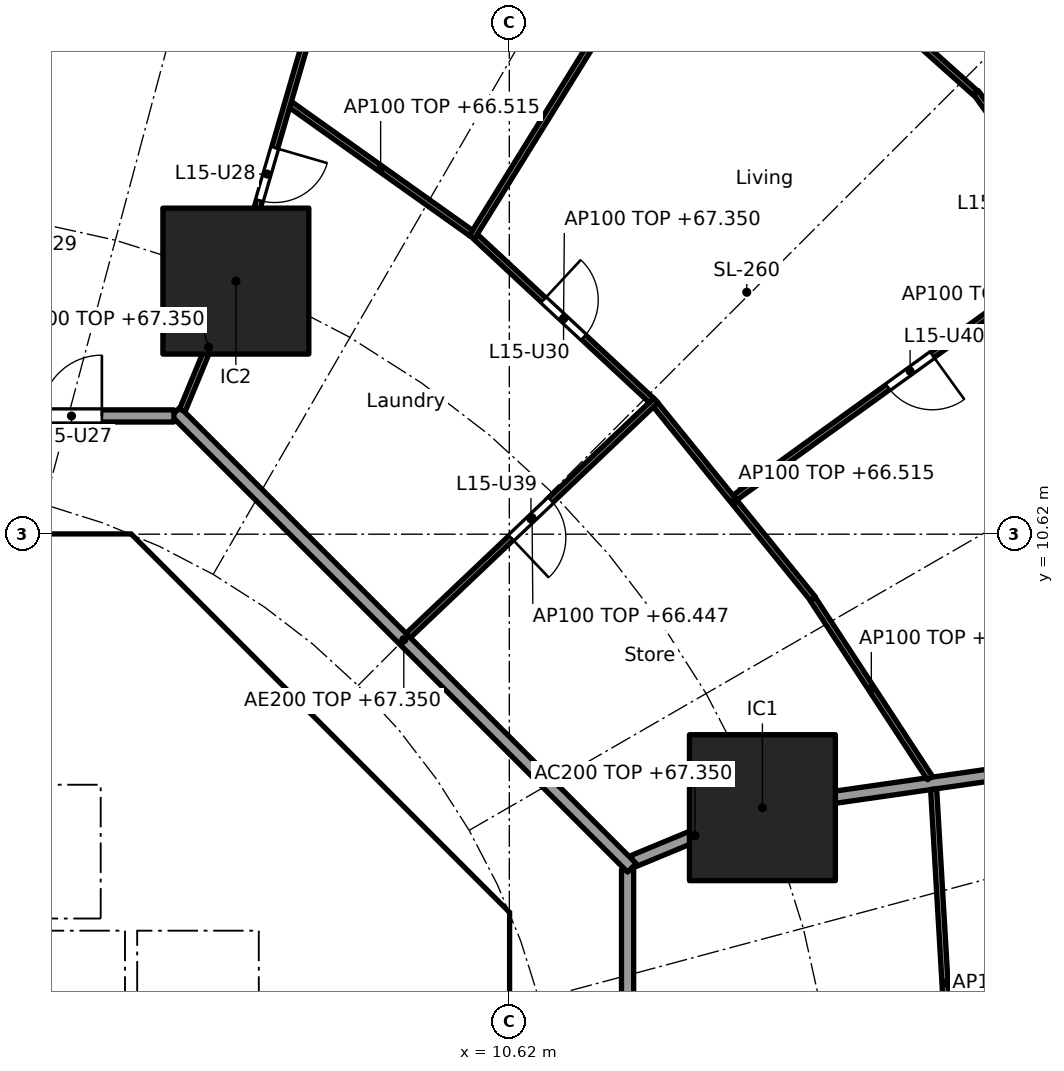
"""IFC4 building model, lengths in metres.
Left out: names, types, materials, properties, quantities, classifications, styles, units other than length and angle.
Written with IfcOpenShell. Run it as: python <this file> out.ifc"""

import sys

from ifc_helpers import new_model, si_unit, direction, frame, frame_2d, origin, origin_2d, place, context, subcontext, project, spatial, polyline, rectangle, outline, extrude, element, fill, save


model = new_model("IFC4")
c1 = context("Model", 3, precision=1e-05, world=origin(), true_north=direction((0.0, 1.0)))
c2 = subcontext(c1, "Body", "Model", "MODEL_VIEW")
j1 = project(units=[si_unit("LENGTHUNIT", "METRE"), si_unit("PLANEANGLEUNIT", "RADIAN")], contexts=[c1])
p1 = place(None, origin())
s1 = spatial("IfcSite", under=j1, at=p1, CompositionType="ELEMENT")
p2 = place(p1, origin())
s2 = spatial("IfcBuilding", under=s1, at=p2, CompositionType="ELEMENT")
p3 = place(p2, frame((0.0, 0.0, 64.0)))
s3 = spatial("IfcBuildingStorey", under=s2, at=p3, CompositionType="ELEMENT", Elevation=64.0)
for number, where, z_axis, x_axis in (
    (1, (14.782, 6.123, 0.0), (0.0, 0.0, 1.0), (1.0, 0.0, 0.0)),
    (2, (6.123, 14.782, 0.0), (0.0, 0.0, 1.0), (1.0, 0.0, 0.0)),
):
    element("IfcColumn", number, at=place(p3, frame(where, z_axis=z_axis, x_axis=x_axis)), inside=s3, PredefinedType="COLUMN", context=c2, shape_type="SweptSolid", body=[
        extrude(rectangle(XDim=2.4, YDim=2.4, at=origin_2d()), origin(), (0.0, 0.0, 1.0), 3.7),
    ])
p4 = place(p3, frame((9.988, 4.613, 0.0), z_axis=(0.0, 0.0, 1.0), x_axis=(-0.707106781187, 0.707106781187, 0.0)))
e3 = element("IfcWall", 3, at=p4, inside=s3, PredefinedType="SHEAR", context=c2, shape_type="SweptSolid", body=[
    extrude(rectangle(XDim=7.602, YDim=0.6, at=frame_2d((3.801, 0.0))), origin(), (0.0, 0.0, 1.0), 3.35),
])
p5 = place(p4, frame((3.201, 0.0, 0.0)))
e4 = element("IfcOpeningElement", 4, at=p5, cuts=e3, PredefinedType="OPENING", context=c2, shape_type="SweptSolid", body=[
    extrude(rectangle(XDim=1.2, YDim=2.1, at=frame_2d((0.6, 1.05))), frame((0.0, 0.31, 0.0), z_axis=(0.0, -1.0, 0.0), x_axis=(1.0, 0.0, 0.0)), (0.0, 0.0, 1.0), 0.62),
])
p6 = place(p3, frame((4.0, 4.3, 0.0), z_axis=(0.0, 0.0, 1.0), x_axis=(0.0, 1.0, 0.0)))
e5 = element("IfcWall", 5, at=p6, inside=s3, PredefinedType="SOLIDWALL", context=c2, shape_type="SweptSolid", body=[
    extrude(rectangle(XDim=2.2, YDim=0.2, at=frame_2d((1.1, 0.0))), origin(), (0.0, 0.0, 1.0), 3.35),
])
p7 = place(p6, frame((0.55, 0.0, 0.0)))
e6 = element("IfcOpeningElement", 6, at=p7, cuts=e5, PredefinedType="OPENING", context=c2, shape_type="SweptSolid", body=[
    extrude(rectangle(XDim=1.1, YDim=2.1, at=frame_2d((0.55, 1.05))), frame((0.0, 0.11, 0.0), z_axis=(0.0, -1.0, 0.0), x_axis=(1.0, 0.0, 0.0)), (0.0, 0.0, 1.0), 0.22),
])
p8 = place(p3, frame((6.7, 4.0, 0.0), z_axis=(0.0, 0.0, 1.0), x_axis=(1.0, 0.0, 0.0)))
e7 = element("IfcWall", 7, at=p8, inside=s3, PredefinedType="SOLIDWALL", context=c2, shape_type="SweptSolid", body=[
    extrude(rectangle(XDim=3.325, YDim=0.2, at=frame_2d((1.662, 0.0))), origin(), (0.0, 0.0, 1.0), 3.35),
])
p9 = place(p8, frame((1.25, 0.0, 0.0)))
e8 = element("IfcOpeningElement", 8, at=p9, cuts=e7, PredefinedType="OPENING", context=c2, shape_type="SweptSolid", body=[
    extrude(rectangle(XDim=1.1, YDim=2.1, at=frame_2d((0.55, 1.05))), frame((0.0, 0.11, 0.0), z_axis=(0.0, -1.0, 0.0), x_axis=(1.0, 0.0, 0.0)), (0.0, 0.0, 1.0), 0.22),
])
p10 = place(p3, frame((4.0, 7.025, 0.0), z_axis=(0.0, 0.0, 1.0), x_axis=(0.0, 1.0, 0.0)))
e9 = element("IfcWall", 9, at=p10, inside=s3, PredefinedType="SOLIDWALL", context=c2, shape_type="SweptSolid", body=[
    extrude(rectangle(XDim=3.0, YDim=0.2, at=frame_2d((1.5, 0.0))), origin(), (0.0, 0.0, 1.0), 3.35),
])
p11 = place(p10, frame((0.925, 0.0, 0.0)))
e10 = element("IfcOpeningElement", 10, at=p11, cuts=e9, PredefinedType="OPENING", context=c2, shape_type="SweptSolid", body=[
    extrude(rectangle(XDim=1.1, YDim=2.1, at=frame_2d((0.55, 1.05))), frame((0.0, 0.11, 0.0), z_axis=(0.0, -1.0, 0.0), x_axis=(1.0, 0.0, 0.0)), (0.0, 0.0, 1.0), 0.22),
])
p12 = place(p3, origin())
e11 = element("IfcWall", 11, at=p12, inside=s3, PredefinedType="SHEAR", context=c2, shape_type="SweptSolid", body=[
    extrude(outline(polyline([(-4.152, 10.025), (-4.401, 9.776), (-4.825, 10.2), (-4.401, 10.625), (4.401, 10.625), (4.825, 10.2), (4.401, 9.776), (4.152, 10.025), (-4.152, 10.025)])), origin(), (0.0, 0.0, 1.0), 3.35),
])
p13 = place(p3, origin())
e12 = element("IfcWall", 12, at=p13, inside=s3, PredefinedType="SHEAR", context=c2, shape_type="SweptSolid", body=[
    extrude(outline(polyline([(9.776, -4.401), (10.025, -4.152), (10.025, -3.801), (10.025, 4.152), (9.776, 4.401), (10.2, 4.825), (10.625, 4.401), (10.625, -4.401), (10.2, -4.825), (9.776, -4.401)])), origin(), (0.0, 0.0, 1.0), 3.35),
])
p14 = place(p3, origin())
e13 = element("IfcWall", 13, at=p14, inside=s3, PredefinedType="SOLIDWALL", context=c2, shape_type="SweptSolid", body=[
    extrude(outline(polyline([(-6.5, 2.1), (-6.7, 2.1), (-6.7, 4.3), (6.7, 4.3), (6.7, 2.1), (6.5, 2.1), (6.5, 4.1), (4.5, 4.1), (4.5, 2.1), (4.3, 2.1), (4.3, 4.1), (2.3, 4.1), (2.3, 2.1), (2.1, 2.1), (2.1, 4.1), (0.1, 4.1), (0.1, 2.1), (-0.1, 2.1), (-0.1, 4.1), (-2.1, 4.1), (-2.1, 2.1), (-2.3, 2.1), (-2.3, 4.1), (-4.3, 4.1), (-4.3, 2.1), (-4.5, 2.1), (-4.5, 4.1), (-6.5, 4.1), (-6.5, 2.1)])), origin(), (0.0, 0.0, 1.0), 3.35),
])
p15 = place(p3, origin())
e14 = element("IfcWall", 14, at=p15, inside=s3, PredefinedType="SOLIDWALL", context=c2, shape_type="SweptSolid", body=[
    extrude(outline(polyline([(4.1, 6.5), (-4.1, 6.5), (-4.1, 7.025), (4.1, 7.025), (4.1, 6.5)])), origin(), (0.0, 0.0, 1.0), 3.35),
])
p16 = place(p3, origin())
e15 = element("IfcWall", 15, at=p16, inside=s3, PredefinedType="SOLIDWALL", context=c2, shape_type="SweptSolid", body=[
    extrude(outline(polyline([(7.025, -3.9), (6.7, -3.9), (6.7, 3.9), (7.025, 3.9), (7.025, -3.9)])), origin(), (0.0, 0.0, 1.0), 3.35),
])
p17 = place(p3, frame((12.657, 5.243, 0.0), z_axis=(0.0, 0.0, 1.0), x_axis=(0.923853160736, 0.382747093259, 0.0)))
e16 = element("IfcWall", 16, at=p17, inside=s3, PredefinedType="PARTITIONING", context=c2, shape_type="SweptSolid", body=[
    extrude(rectangle(XDim=2.2, YDim=0.2, at=frame_2d((1.1, 0.0))), origin(), (0.0, 0.0, 1.0), 3.35),
])
p18 = place(p3, frame((14.832, 6.13, 0.0), z_axis=(0.0, 0.0, 1.0), x_axis=(0.989836541293, 0.142209779978, 0.0)))
e17 = element("IfcWall", 17, at=p18, inside=s3, PredefinedType="PARTITIONING", context=c2, shape_type="SweptSolid", body=[
    extrude(rectangle(XDim=15.909, YDim=0.2, at=frame_2d((7.955, 0.0))), origin(), (0.0, 0.0, 1.0), 2.515),
])
p19 = place(p3, frame((12.565, -5.104, 0.0), z_axis=(0.0, 0.0, 1.0), x_axis=(0.0, 1.0, 0.0)))
e18 = element("IfcWall", 18, at=p19, inside=s3, PredefinedType="PARTITIONING", context=c2, shape_type="SweptSolid", body=[
    extrude(rectangle(XDim=10.209, YDim=0.2, at=frame_2d((5.104, 0.0))), origin(), (0.0, 0.0, 1.0), 3.35),
])
p20 = place(p3, frame((12.635, 5.134, 0.0), z_axis=(0.0, 0.0, 1.0), x_axis=(-0.707106781187, 0.707106781187, 0.0)))
e19 = element("IfcWall", 19, at=p20, inside=s3, PredefinedType="PARTITIONING", context=c2, shape_type="SweptSolid", body=[
    extrude(rectangle(XDim=10.609, YDim=0.2, at=frame_2d((5.305, 0.0))), origin(), (0.0, 0.0, 1.0), 3.35),
])
p21 = place(p3, frame((5.104, 12.565, 0.0), z_axis=(0.0, 0.0, 1.0), x_axis=(-1.0, 0.0, 0.0)))
e20 = element("IfcWall", 20, at=p21, inside=s3, PredefinedType="PARTITIONING", context=c2, shape_type="SweptSolid", body=[
    extrude(rectangle(XDim=10.409, YDim=0.2, at=frame_2d((5.205, 0.0))), origin(), (0.0, 0.0, 1.0), 3.35),
])
p22 = place(p21, frame((1.185, 0.0, 0.0)))
e21 = element("IfcOpeningElement", 21, at=p22, cuts=e20, PredefinedType="OPENING", context=c2, shape_type="SweptSolid", body=[
    extrude(rectangle(XDim=1.0, YDim=2.1, at=frame_2d((0.5, 1.05))), frame((0.0, 0.11, 0.0), z_axis=(0.0, -1.0, 0.0), x_axis=(1.0, 0.0, 0.0)), (0.0, 0.0, 1.0), 0.22),
])
p23 = place(p3, frame((17.971, 0.05, 0.0), z_axis=(0.0, 0.0, 1.0), x_axis=(-0.058513659907, 0.998286607946, 0.0)))
e22 = element("IfcWall", 22, at=p23, inside=s3, PredefinedType="PARTITIONING", context=c2, shape_type="SweptSolid", body=[
    extrude(rectangle(XDim=6.388, YDim=0.1, at=frame_2d((3.194, 0.0))), origin(), (0.0, 0.0, 1.0), 2.515),
])
p24 = place(p3, frame((17.537, 6.61, 0.0), z_axis=(0.0, 0.0, 1.0), x_axis=(-0.547637987196, 0.836715384692, 0.0)))
e23 = element("IfcWall", 23, at=p24, inside=s3, PredefinedType="PARTITIONING", context=c2, shape_type="SweptSolid", body=[
    extrude(rectangle(XDim=3.52, YDim=0.1, at=frame_2d((1.76, 0.0))), origin(), (0.0, 0.0, 1.0), 2.515),
])
p25 = place(p3, frame((15.614, 9.559, 0.0), z_axis=(0.0, 0.0, 1.0), x_axis=(-0.63012473344, 0.776493928056, 0.0)))
e24 = element("IfcWall", 24, at=p25, inside=s3, PredefinedType="PARTITIONING", context=c2, shape_type="SweptSolid", body=[
    extrude(rectangle(XDim=4.106, YDim=0.1, at=frame_2d((2.053, 0.0))), origin(), (0.0, 0.0, 1.0), 2.515),
])
p26 = place(p3, frame((21.908, 12.866, 0.0), z_axis=(0.0, 0.0, 1.0), x_axis=(-0.584553256988, 0.811355341231, 0.0)))
e25 = element("IfcWall", 25, at=p26, inside=s3, PredefinedType="PARTITIONING", context=c2, shape_type="SweptSolid", body=[
    extrude(rectangle(XDim=6.184, YDim=0.1, at=frame_2d((3.092, 0.0))), origin(), (0.0, 0.0, 1.0), 2.515),
])
p27 = place(p26, frame((4.163, 0.0, 0.0)))
e26 = element("IfcOpeningElement", 26, at=p27, cuts=e25, PredefinedType="OPENING", context=c2, shape_type="SweptSolid", body=[
    extrude(rectangle(XDim=0.9, YDim=2.1, at=frame_2d((0.45, 1.05))), frame((0.0, 0.06, 0.0), z_axis=(0.0, -1.0, 0.0), x_axis=(1.0, 0.0, 0.0)), (0.0, 0.0, 1.0), 0.12),
])
p28 = place(p3, frame((14.329, 11.221, 0.0), z_axis=(0.0, 0.0, 1.0), x_axis=(0.810671130917, 0.58550176558, 0.0)))
e27 = element("IfcWall", 27, at=p28, inside=s3, PredefinedType="PARTITIONING", context=c2, shape_type="SweptSolid", body=[
    extrude(rectangle(XDim=15.106, YDim=0.1, at=frame_2d((7.553, 0.0))), origin(), (0.0, 0.0, 1.0), 2.738),
])
p29 = place(p28, frame((3.105, 0.0, 0.0)))
e28 = element("IfcOpeningElement", 28, at=p29, cuts=e27, PredefinedType="OPENING", context=c2, shape_type="SweptSolid", body=[
    extrude(rectangle(XDim=0.9, YDim=2.1, at=frame_2d((0.45, 1.05))), frame((0.0, 0.06, 0.0), z_axis=(0.0, -1.0, 0.0), x_axis=(1.0, 0.0, 0.0)), (0.0, 0.0, 1.0), 0.12),
])
p30 = place(p3, frame((8.957, 8.953, 0.0), z_axis=(0.0, 0.0, 1.0), x_axis=(0.725253319157, 0.688482115273, 0.0)))
e29 = element("IfcWall", 29, at=p30, inside=s3, PredefinedType="PARTITIONING", context=c2, shape_type="SweptSolid", body=[
    extrude(rectangle(XDim=5.617, YDim=0.1, at=frame_2d((2.809, 0.0))), origin(), (0.0, 0.0, 1.0), 2.447),
])
p31 = place(p30, frame((2.333, 0.0, 0.0)))
e30 = element("IfcOpeningElement", 30, at=p31, cuts=e29, PredefinedType="OPENING", context=c2, shape_type="SweptSolid", body=[
    extrude(rectangle(XDim=0.9, YDim=2.1, at=frame_2d((0.45, 1.05))), frame((0.0, 0.06, 0.0), z_axis=(0.0, -1.0, 0.0), x_axis=(1.0, 0.0, 0.0)), (0.0, 0.0, 1.0), 0.12),
])
p32 = place(p3, frame((12.958, 12.82, 0.0), z_axis=(0.0, 0.0, 1.0), x_axis=(-0.732022571638, 0.681280378855, 0.0)))
e31 = element("IfcWall", 31, at=p32, inside=s3, PredefinedType="PARTITIONING", context=c2, shape_type="SweptSolid", body=[
    extrude(rectangle(XDim=3.95, YDim=0.1, at=frame_2d((1.975, 0.0))), origin(), (0.0, 0.0, 1.0), 3.35),
])
p33 = place(p32, frame((1.525, 0.0, 0.0)))
e32 = element("IfcOpeningElement", 32, at=p33, cuts=e31, PredefinedType="OPENING", context=c2, shape_type="SweptSolid", body=[
    extrude(rectangle(XDim=0.9, YDim=2.1, at=frame_2d((0.45, 1.05))), frame((0.0, 0.06, 0.0), z_axis=(0.0, -1.0, 0.0), x_axis=(1.0, 0.0, 0.0)), (0.0, 0.0, 1.0), 0.12),
])
p34 = place(p3, frame((18.285, 17.877, 0.0), z_axis=(0.0, 0.0, 1.0), x_axis=(-0.745806142791, 0.666163041136, 0.0)))
e33 = element("IfcWall", 33, at=p34, inside=s3, PredefinedType="PARTITIONING", context=c2, shape_type="SweptSolid", body=[
    extrude(rectangle(XDim=5.831, YDim=0.1, at=frame_2d((2.915, 0.0))), origin(), (0.0, 0.0, 1.0), 2.515),
])
p35 = place(p34, frame((3.923, 0.0, 0.0)))
e34 = element("IfcOpeningElement", 34, at=p35, cuts=e33, PredefinedType="OPENING", context=c2, shape_type="SweptSolid", body=[
    extrude(rectangle(XDim=0.9, YDim=2.1, at=frame_2d((0.45, 1.05))), frame((0.0, 0.06, 0.0), z_axis=(0.0, -1.0, 0.0), x_axis=(1.0, 0.0, 0.0)), (0.0, 0.0, 1.0), 0.12),
])
p36 = place(p3, frame((10.003, 15.503, 0.0), z_axis=(0.0, 0.0, 1.0), x_axis=(0.52645953022, 0.850200189979, 0.0)))
e35 = element("IfcWall", 35, at=p36, inside=s3, PredefinedType="PARTITIONING", context=c2, shape_type="SweptSolid", body=[
    extrude(rectangle(XDim=7.45, YDim=0.1, at=frame_2d((3.725, 0.0))), origin(), (0.0, 0.0, 1.0), 2.515),
])
p37 = place(p3, frame((9.989, 15.574, 0.0), z_axis=(0.0, 0.0, 1.0), x_axis=(-0.81494477814, 0.57953861699, 0.0)))
e36 = element("IfcWall", 36, at=p37, inside=s3, PredefinedType="PARTITIONING", context=c2, shape_type="SweptSolid", body=[
    extrude(rectangle(XDim=3.644, YDim=0.1, at=frame_2d((1.822, 0.0))), origin(), (0.0, 0.0, 1.0), 2.515),
])
p38 = place(p3, frame((5.243, 12.657, 0.0), z_axis=(0.0, 0.0, 1.0), x_axis=(0.382719158442, 0.923864733477, 0.0)))
e37 = element("IfcWall", 37, at=p38, inside=s3, PredefinedType="PARTITIONING", context=c2, shape_type="SweptSolid", body=[
    extrude(rectangle(XDim=2.25, YDim=0.1, at=frame_2d((1.125, 0.0))), origin(), (0.0, 0.0, 1.0), 3.35),
])
p39 = place(p3, frame((6.137, 14.83, 0.0), z_axis=(0.0, 0.0, 1.0), x_axis=(0.27985745069, 0.960041565399, 0.0)))
e38 = element("IfcWall", 38, at=p39, inside=s3, PredefinedType="PARTITIONING", context=c2, shape_type="SweptSolid", body=[
    extrude(rectangle(XDim=16.705, YDim=0.1, at=frame_2d((8.353, 0.0))), origin(), (0.0, 0.0, 1.0), 2.515),
])
p40 = place(p39, frame((1.334, 0.0, 0.0)))
e39 = element("IfcOpeningElement", 39, at=p40, cuts=e38, PredefinedType="OPENING", context=c2, shape_type="SweptSolid", body=[
    extrude(rectangle(XDim=0.9, YDim=2.1, at=frame_2d((0.45, 1.05))), frame((0.0, 0.06, 0.0), z_axis=(0.0, -1.0, 0.0), x_axis=(1.0, 0.0, 0.0)), (0.0, 0.0, 1.0), 0.12),
])
p41 = place(p39, frame((6.091, 0.0, 0.0)))
e40 = element("IfcOpeningElement", 40, at=p41, cuts=e38, PredefinedType="OPENING", context=c2, shape_type="SweptSolid", body=[
    extrude(rectangle(XDim=0.9, YDim=2.1, at=frame_2d((0.45, 1.05))), frame((0.0, 0.06, 0.0), z_axis=(0.0, -1.0, 0.0), x_axis=(1.0, 0.0, 0.0)), (0.0, 0.0, 1.0), 0.12),
])
p42 = place(p3, frame((1.744, 12.664, 0.0), z_axis=(0.0, 0.0, 1.0), x_axis=(0.090893639596, 0.995860605849, 0.0)))
e41 = element("IfcWall", 41, at=p42, inside=s3, PredefinedType="PARTITIONING", context=c2, shape_type="SweptSolid", body=[
    extrude(rectangle(XDim=19.374, YDim=0.1, at=frame_2d((9.687, 0.0))), origin(), (0.0, 0.0, 1.0), 2.447),
])
p43 = place(p42, frame((2.27, 0.0, 0.0)))
e42 = element("IfcOpeningElement", 42, at=p43, cuts=e41, PredefinedType="OPENING", context=c2, shape_type="SweptSolid", body=[
    extrude(rectangle(XDim=0.9, YDim=2.1, at=frame_2d((0.45, 1.05))), frame((0.0, 0.06, 0.0), z_axis=(0.0, -1.0, 0.0), x_axis=(1.0, 0.0, 0.0)), (0.0, 0.0, 1.0), 0.12),
])
p44 = place(p42, frame((8.582, 0.0, 0.0)))
e43 = element("IfcOpeningElement", 43, at=p44, cuts=e41, PredefinedType="OPENING", context=c2, shape_type="SweptSolid", body=[
    extrude(rectangle(XDim=0.9, YDim=2.1, at=frame_2d((0.45, 1.05))), frame((0.0, 0.06, 0.0), z_axis=(0.0, -1.0, 0.0), x_axis=(1.0, 0.0, 0.0)), (0.0, 0.0, 1.0), 0.12),
])
p45 = place(p42, frame((15.548, 0.0, 0.0)))
e44 = element("IfcOpeningElement", 44, at=p45, cuts=e41, PredefinedType="OPENING", context=c2, shape_type="SweptSolid", body=[
    extrude(rectangle(XDim=0.9, YDim=2.1, at=frame_2d((0.45, 1.05))), frame((0.0, 0.06, 0.0), z_axis=(0.0, -1.0, 0.0), x_axis=(1.0, 0.0, 0.0)), (0.0, 0.0, 1.0), 0.12),
])
p46 = place(p7, origin())
e45 = element("IfcDoor", 45, at=p46, inside=s3, OperationType="DOUBLE_DOOR_SLIDING", PredefinedType="DOOR", context=c2, shape_type="SweptSolid", body=[
    extrude(rectangle(XDim=1.1, YDim=2.1, at=frame_2d((0.55, 1.05))), frame((0.0, 0.025, 0.0), z_axis=(0.0, -1.0, 0.0), x_axis=(1.0, 0.0, 0.0)), (0.0, 0.0, 1.0), 0.05),
])
fill(e6, e45)
p47 = place(p9, frame((1.1, 0.0, 0.0), x_axis=(-1.0, 0.0, 0.0)))
e46 = element("IfcDoor", 46, at=p47, inside=s3, OperationType="SINGLE_SWING_LEFT", PredefinedType="DOOR", context=c2, shape_type="SweptSolid", body=[
    extrude(rectangle(XDim=1.1, YDim=2.1, at=frame_2d((0.55, 1.05))), frame((0.0, 0.025, 0.0), z_axis=(0.0, -1.0, 0.0), x_axis=(1.0, 0.0, 0.0)), (0.0, 0.0, 1.0), 0.05),
])
fill(e8, e46)
p48 = place(p11, origin())
e47 = element("IfcDoor", 47, at=p48, inside=s3, OperationType="SINGLE_SWING_RIGHT", PredefinedType="DOOR", context=c2, shape_type="SweptSolid", body=[
    extrude(rectangle(XDim=1.1, YDim=2.1, at=frame_2d((0.55, 1.05))), frame((0.0, 0.025, 0.0), z_axis=(0.0, -1.0, 0.0), x_axis=(1.0, 0.0, 0.0)), (0.0, 0.0, 1.0), 0.05),
])
fill(e10, e47)
p49 = place(p5, origin())
e48 = element("IfcDoor", 48, at=p49, inside=s3, OperationType="SINGLE_SWING_RIGHT", PredefinedType="DOOR", context=c2, shape_type="SweptSolid", body=[
    extrude(rectangle(XDim=1.2, YDim=2.1, at=frame_2d((0.6, 1.05))), frame((0.0, 0.025, 0.0), z_axis=(0.0, -1.0, 0.0), x_axis=(1.0, 0.0, 0.0)), (0.0, 0.0, 1.0), 0.05),
])
fill(e4, e48)
p50 = place(p22, frame((1.0, 0.0, 0.0), x_axis=(-1.0, 0.0, 0.0)))
e49 = element("IfcDoor", 49, at=p50, inside=s3, OperationType="SINGLE_SWING_RIGHT", PredefinedType="DOOR", context=c2, shape_type="SweptSolid", body=[
    extrude(rectangle(XDim=1.0, YDim=2.1, at=frame_2d((0.5, 1.05))), frame((0.0, 0.025, 0.0), z_axis=(0.0, -1.0, 0.0), x_axis=(1.0, 0.0, 0.0)), (0.0, 0.0, 1.0), 0.05),
])
fill(e21, e49)
p51 = place(p40, frame((0.9, 0.0, 0.0), x_axis=(-1.0, 0.0, 0.0)))
e50 = element("IfcDoor", 50, at=p51, inside=s3, OperationType="SINGLE_SWING_LEFT", PredefinedType="DOOR", context=c2, shape_type="SweptSolid", body=[
    extrude(rectangle(XDim=0.9, YDim=2.1, at=frame_2d((0.45, 1.05))), frame((0.0, 0.025, 0.0), z_axis=(0.0, -1.0, 0.0), x_axis=(1.0, 0.0, 0.0)), (0.0, 0.0, 1.0), 0.05),
])
fill(e39, e50)
p52 = place(p33, frame((0.9, 0.0, 0.0), x_axis=(-1.0, 0.0, 0.0)))
e51 = element("IfcDoor", 51, at=p52, inside=s3, OperationType="SINGLE_SWING_LEFT", PredefinedType="DOOR", context=c2, shape_type="SweptSolid", body=[
    extrude(rectangle(XDim=0.9, YDim=2.1, at=frame_2d((0.45, 1.05))), frame((0.0, 0.025, 0.0), z_axis=(0.0, -1.0, 0.0), x_axis=(1.0, 0.0, 0.0)), (0.0, 0.0, 1.0), 0.05),
])
fill(e32, e51)
p53 = place(p31, frame((0.9, 0.0, 0.0), x_axis=(-1.0, 0.0, 0.0)))
e52 = element("IfcDoor", 52, at=p53, inside=s3, OperationType="SINGLE_SWING_RIGHT", PredefinedType="DOOR", context=c2, shape_type="SweptSolid", body=[
    extrude(rectangle(XDim=0.9, YDim=2.1, at=frame_2d((0.45, 1.05))), frame((0.0, 0.025, 0.0), z_axis=(0.0, -1.0, 0.0), x_axis=(1.0, 0.0, 0.0)), (0.0, 0.0, 1.0), 0.05),
])
fill(e30, e52)
p54 = place(p29, frame((0.9, 0.0, 0.0), x_axis=(-1.0, 0.0, 0.0)))
e53 = element("IfcDoor", 53, at=p54, inside=s3, OperationType="SINGLE_SWING_LEFT", PredefinedType="DOOR", context=c2, shape_type="SweptSolid", body=[
    extrude(rectangle(XDim=0.9, YDim=2.1, at=frame_2d((0.45, 1.05))), frame((0.0, 0.025, 0.0), z_axis=(0.0, -1.0, 0.0), x_axis=(1.0, 0.0, 0.0)), (0.0, 0.0, 1.0), 0.05),
])
fill(e28, e53)
save(model, sys.argv[1])
